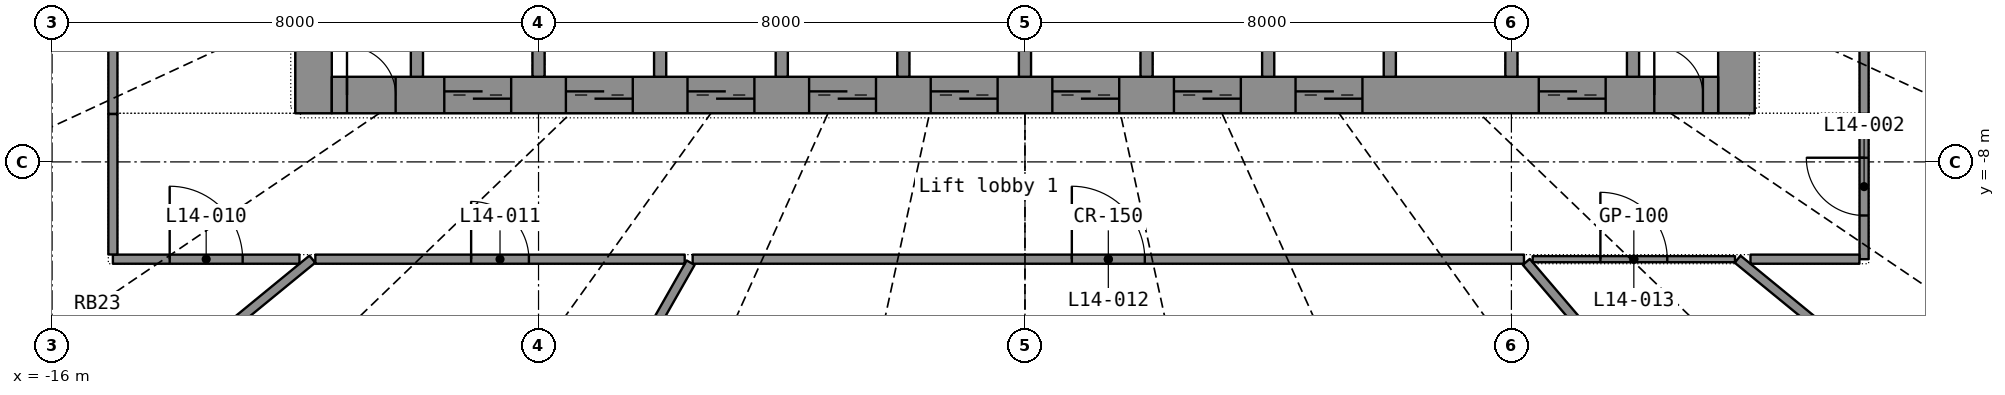
"""IFC4 building model, lengths in metres.
Left out: names, types, materials, properties, quantities, classifications, styles, units other than length and angle.
Written with IfcOpenShell. Run it as: python <this file> out.ifc"""

import sys

from ifc_helpers import new_model, si_unit, direction, frame, frame_2d, origin, place, context, subcontext, project, spatial, rectangle, extrude, element, fill, save


model = new_model("IFC4")
c1 = context("Model", 3, precision=1e-05, world=origin(), true_north=direction((0.0, 1.0)))
c2 = subcontext(c1, "Body", "Model", "MODEL_VIEW")
j1 = project(units=[si_unit("LENGTHUNIT", "METRE"), si_unit("PLANEANGLEUNIT", "RADIAN")], contexts=[c1])
p1 = place(None, origin())
s1 = spatial("IfcSite", under=j1, at=p1, CompositionType="ELEMENT")
p2 = place(p1, origin())
s2 = spatial("IfcBuilding", under=s1, at=p2, CompositionType="ELEMENT")
p3 = place(p2, frame((0.0, 0.0, 63.0)))
s3 = spatial("IfcBuildingStorey", under=s2, at=p3, CompositionType="ELEMENT", Elevation=63.0)
p4 = place(p3, frame((-11.7, -7.2, 0.0), z_axis=(0.0, 0.0, 1.0), x_axis=(0.0, 1.0, 0.0)))
e1 = element("IfcWall", 1, at=p4, inside=s3, PredefinedType="SHEAR", context=c2, shape_type="SweptSolid", body=[
    extrude(rectangle(XDim=14.4, YDim=0.6, at=frame_2d((7.2, 0.0))), origin(), (0.0, 0.0, 1.0), 3.3),
])
p5 = place(p4, frame((6.5, 0.0, 0.0)))
e2 = element("IfcOpeningElement", 2, at=p5, cuts=e1, PredefinedType="OPENING", context=c2, shape_type="SweptSolid", body=[
    extrude(rectangle(XDim=1.4, YDim=2.2, at=frame_2d((0.7, 1.1))), frame((0.0, 0.31, 0.0), z_axis=(0.0, -1.0, 0.0), x_axis=(1.0, 0.0, 0.0)), (0.0, 0.0, 1.0), 0.62),
])
p6 = place(p3, frame((11.7, -7.2, 0.0), z_axis=(0.0, 0.0, 1.0), x_axis=(0.0, 1.0, 0.0)))
e3 = element("IfcWall", 3, at=p6, inside=s3, PredefinedType="SHEAR", context=c2, shape_type="SweptSolid", body=[
    extrude(rectangle(XDim=14.4, YDim=0.6, at=frame_2d((7.2, 0.0))), origin(), (0.0, 0.0, 1.0), 3.3),
])
p7 = place(p6, frame((6.5, 0.0, 0.0)))
e4 = element("IfcOpeningElement", 4, at=p7, cuts=e3, PredefinedType="OPENING", context=c2, shape_type="SweptSolid", body=[
    extrude(rectangle(XDim=1.4, YDim=2.2, at=frame_2d((0.7, 1.1))), frame((0.0, 0.31, 0.0), z_axis=(0.0, -1.0, 0.0), x_axis=(1.0, 0.0, 0.0)), (0.0, 0.0, 1.0), 0.62),
])
p8 = place(p3, frame((-11.4, -6.9, 0.0), z_axis=(0.0, 0.0, 1.0), x_axis=(1.0, 0.0, 0.0)))
e5 = element("IfcWall", 5, at=p8, inside=s3, PredefinedType="SHEAR", context=c2, shape_type="SweptSolid", body=[
    extrude(rectangle(XDim=22.8, YDim=0.6, at=frame_2d((11.4, 0.0))), origin(), (0.0, 0.0, 1.0), 3.3),
])
p9 = place(p8, frame((1.85, 0.0, 0.0)))
e6 = element("IfcOpeningElement", 6, at=p9, cuts=e5, PredefinedType="OPENING", context=c2, shape_type="SweptSolid", body=[
    extrude(rectangle(XDim=1.1, YDim=2.2, at=frame_2d((0.55, 1.1))), frame((0.0, 0.31, 0.0), z_axis=(0.0, -1.0, 0.0), x_axis=(1.0, 0.0, 0.0)), (0.0, 0.0, 1.0), 0.62),
])
p10 = place(p8, frame((3.85, 0.0, 0.0)))
e7 = element("IfcOpeningElement", 7, at=p10, cuts=e5, PredefinedType="OPENING", context=c2, shape_type="SweptSolid", body=[
    extrude(rectangle(XDim=1.1, YDim=2.2, at=frame_2d((0.55, 1.1))), frame((0.0, 0.31, 0.0), z_axis=(0.0, -1.0, 0.0), x_axis=(1.0, 0.0, 0.0)), (0.0, 0.0, 1.0), 0.62),
])
p11 = place(p8, frame((5.85, 0.0, 0.0)))
e8 = element("IfcOpeningElement", 8, at=p11, cuts=e5, PredefinedType="OPENING", context=c2, shape_type="SweptSolid", body=[
    extrude(rectangle(XDim=1.1, YDim=2.2, at=frame_2d((0.55, 1.1))), frame((0.0, 0.31, 0.0), z_axis=(0.0, -1.0, 0.0), x_axis=(1.0, 0.0, 0.0)), (0.0, 0.0, 1.0), 0.62),
])
p12 = place(p8, frame((7.85, 0.0, 0.0)))
e9 = element("IfcOpeningElement", 9, at=p12, cuts=e5, PredefinedType="OPENING", context=c2, shape_type="SweptSolid", body=[
    extrude(rectangle(XDim=1.1, YDim=2.2, at=frame_2d((0.55, 1.1))), frame((0.0, 0.31, 0.0), z_axis=(0.0, -1.0, 0.0), x_axis=(1.0, 0.0, 0.0)), (0.0, 0.0, 1.0), 0.62),
])
p13 = place(p8, frame((9.85, 0.0, 0.0)))
e10 = element("IfcOpeningElement", 10, at=p13, cuts=e5, PredefinedType="OPENING", context=c2, shape_type="SweptSolid", body=[
    extrude(rectangle(XDim=1.1, YDim=2.2, at=frame_2d((0.55, 1.1))), frame((0.0, 0.31, 0.0), z_axis=(0.0, -1.0, 0.0), x_axis=(1.0, 0.0, 0.0)), (0.0, 0.0, 1.0), 0.62),
])
p14 = place(p8, frame((11.85, 0.0, 0.0)))
e11 = element("IfcOpeningElement", 11, at=p14, cuts=e5, PredefinedType="OPENING", context=c2, shape_type="SweptSolid", body=[
    extrude(rectangle(XDim=1.1, YDim=2.2, at=frame_2d((0.55, 1.1))), frame((0.0, 0.31, 0.0), z_axis=(0.0, -1.0, 0.0), x_axis=(1.0, 0.0, 0.0)), (0.0, 0.0, 1.0), 0.62),
])
p15 = place(p8, frame((13.85, 0.0, 0.0)))
e12 = element("IfcOpeningElement", 12, at=p15, cuts=e5, PredefinedType="OPENING", context=c2, shape_type="SweptSolid", body=[
    extrude(rectangle(XDim=1.1, YDim=2.2, at=frame_2d((0.55, 1.1))), frame((0.0, 0.31, 0.0), z_axis=(0.0, -1.0, 0.0), x_axis=(1.0, 0.0, 0.0)), (0.0, 0.0, 1.0), 0.62),
])
p16 = place(p8, frame((15.85, 0.0, 0.0)))
e13 = element("IfcOpeningElement", 13, at=p16, cuts=e5, PredefinedType="OPENING", context=c2, shape_type="SweptSolid", body=[
    extrude(rectangle(XDim=1.1, YDim=2.2, at=frame_2d((0.55, 1.1))), frame((0.0, 0.31, 0.0), z_axis=(0.0, -1.0, 0.0), x_axis=(1.0, 0.0, 0.0)), (0.0, 0.0, 1.0), 0.62),
])
p17 = place(p8, frame((19.85, 0.0, 0.0)))
e14 = element("IfcOpeningElement", 14, at=p17, cuts=e5, PredefinedType="OPENING", context=c2, shape_type="SweptSolid", body=[
    extrude(rectangle(XDim=1.1, YDim=2.2, at=frame_2d((0.55, 1.1))), frame((0.0, 0.31, 0.0), z_axis=(0.0, -1.0, 0.0), x_axis=(1.0, 0.0, 0.0)), (0.0, 0.0, 1.0), 0.62),
])
p18 = place(p8, frame((0.25, 0.0, 0.0)))
e15 = element("IfcOpeningElement", 15, at=p18, cuts=e5, PredefinedType="OPENING", context=c2, shape_type="SweptSolid", body=[
    extrude(rectangle(XDim=0.8, YDim=2.05, at=frame_2d((0.4, 1.025))), frame((0.0, 0.31, 0.0), z_axis=(0.0, -1.0, 0.0), x_axis=(1.0, 0.0, 0.0)), (0.0, 0.0, 1.0), 0.62),
])
p19 = place(p8, frame((21.75, 0.0, 0.0)))
e16 = element("IfcOpeningElement", 16, at=p19, cuts=e5, PredefinedType="OPENING", context=c2, shape_type="SweptSolid", body=[
    extrude(rectangle(XDim=0.8, YDim=2.05, at=frame_2d((0.4, 1.025))), frame((0.0, 0.31, 0.0), z_axis=(0.0, -1.0, 0.0), x_axis=(1.0, 0.0, 0.0)), (0.0, 0.0, 1.0), 0.62),
])
for number, where, z_axis, x_axis in (
    (17, (-10.0, -6.6, 0.0), (0.0, 0.0, 1.0), (0.0, 1.0, 0.0)),
    (18, (-8.0, -6.6, 0.0), (0.0, 0.0, 1.0), (0.0, 1.0, 0.0)),
    (19, (-6.0, -6.6, 0.0), (0.0, 0.0, 1.0), (0.0, 1.0, 0.0)),
    (20, (-4.0, -6.6, 0.0), (0.0, 0.0, 1.0), (0.0, 1.0, 0.0)),
    (21, (-2.0, -6.6, 0.0), (0.0, 0.0, 1.0), (0.0, 1.0, 0.0)),
    (22, (0.0, -6.6, 0.0), (0.0, 0.0, 1.0), (0.0, 1.0, 0.0)),
    (23, (2.0, -6.6, 0.0), (0.0, 0.0, 1.0), (0.0, 1.0, 0.0)),
    (24, (4.0, -6.6, 0.0), (0.0, 0.0, 1.0), (0.0, 1.0, 0.0)),
    (25, (6.0, -6.6, 0.0), (0.0, 0.0, 1.0), (0.0, 1.0, 0.0)),
    (26, (8.0, -6.6, 0.0), (0.0, 0.0, 1.0), (0.0, 1.0, 0.0)),
    (27, (10.0, -6.6, 0.0), (0.0, 0.0, 1.0), (0.0, 1.0, 0.0)),
):
    element("IfcWall", number, at=place(p3, frame(where, z_axis=z_axis, x_axis=x_axis)), inside=s3, PredefinedType="SHEAR", context=c2, shape_type="SweptSolid", body=[
        extrude(rectangle(XDim=2.7, YDim=0.2, at=frame_2d((1.35, 0.0))), origin(), (0.0, 0.0, 1.0), 3.3),
    ])
p20 = place(p3, frame((-5.465, -9.6, 0.0), z_axis=(0.0, 0.0, 1.0), x_axis=(1.0, 0.0, 0.0)))
e28 = element("IfcWall", 28, at=p20, inside=s3, PredefinedType="PARTITIONING", context=c2, shape_type="SweptSolid", body=[
    extrude(rectangle(XDim=13.672, YDim=0.15, at=frame_2d((6.836, 0.0))), origin(), (0.0, 0.0, 1.0), 2.4),
])
p21 = place(p20, frame((6.236, 0.0, 0.0)))
e29 = element("IfcOpeningElement", 29, at=p21, cuts=e28, PredefinedType="OPENING", context=c2, shape_type="SweptSolid", body=[
    extrude(rectangle(XDim=1.2, YDim=2.2, at=frame_2d((0.6, 1.1))), frame((0.0, 0.085, 0.0), z_axis=(0.0, -1.0, 0.0), x_axis=(1.0, 0.0, 0.0)), (0.0, 0.0, 1.0), 0.17),
])
p22 = place(p3, frame((-11.476, -20.159, 0.0), z_axis=(0.0, 0.0, 1.0), x_axis=(0.494734776, 0.869044016, 0.0)))
e30 = element("IfcWall", 30, at=p22, inside=s3, PredefinedType="PARTITIONING", context=c2, shape_type="SweptSolid", body=[
    extrude(rectangle(XDim=12.083, YDim=0.15, at=frame_2d((6.042, 0.0))), origin(), (0.0, 0.0, 1.0), 2.4),
])
p23 = place(p3, frame((15.577, -18.223, 0.0), z_axis=(0.0, 0.0, 1.0), x_axis=(-0.649782359, 0.76012031, 0.0)))
e31 = element("IfcWall", 31, at=p23, inside=s3, PredefinedType="PARTITIONING", context=c2, shape_type="SweptSolid", body=[
    extrude(rectangle(XDim=11.285, YDim=0.15, at=frame_2d((5.642, 0.0))), origin(), (0.0, 0.0, 1.0), 2.4),
])
p24 = place(p3, frame((-15.0, 3.217, 0.0), z_axis=(0.0, 0.0, 1.0), x_axis=(0.0, -1.0, 0.0)))
e32 = element("IfcWall", 32, at=p24, inside=s3, PredefinedType="PARTITIONING", context=c2, shape_type="SweptSolid", body=[
    extrude(rectangle(XDim=10.429, YDim=0.15, at=frame_2d((5.214, 0.0))), origin(), (0.0, 0.0, 1.0), 2.4),
])
p25 = place(p24, frame((4.615, 0.0, 0.0)))
e33 = element("IfcOpeningElement", 33, at=p25, cuts=e32, PredefinedType="OPENING", context=c2, shape_type="SweptSolid", body=[
    extrude(rectangle(XDim=1.2, YDim=2.2, at=frame_2d((0.6, 1.1))), frame((0.0, 0.085, 0.0), z_axis=(0.0, -1.0, 0.0), x_axis=(1.0, 0.0, 0.0)), (0.0, 0.0, 1.0), 0.17),
])
for number, where, z_axis, x_axis in (
    (34, (-19.207, -15.733, 0.0), (0.0, 0.0, 1.0), (0.774, 0.634, 0.0)),
    (35, (11.72, -9.6, 0.0), (0.0, 0.0, 1.0), (0.774, -0.634, 0.0)),
):
    element("IfcWall", number, at=place(p3, frame(where, z_axis=z_axis, x_axis=x_axis)), inside=s3, PredefinedType="PARTITIONING", context=c2, shape_type="SweptSolid", body=[
        extrude(rectangle(XDim=9.678, YDim=0.15, at=frame_2d((4.839, 0.0))), origin(), (0.0, 0.0, 1.0), 2.4),
    ])
p26 = place(p3, frame((-11.671, -9.6, 0.0), z_axis=(0.0, 0.0, 1.0), x_axis=(1.0, 0.0, 0.0)))
e36 = element("IfcWall", 36, at=p26, inside=s3, PredefinedType="PARTITIONING", context=c2, shape_type="SweptSolid", body=[
    extrude(rectangle(XDim=6.074, YDim=0.15, at=frame_2d((3.037, 0.0))), origin(), (0.0, 0.0, 1.0), 2.4),
])
p27 = place(p26, frame((2.562, 0.0, 0.0)))
e37 = element("IfcOpeningElement", 37, at=p27, cuts=e36, PredefinedType="OPENING", context=c2, shape_type="SweptSolid", body=[
    extrude(rectangle(XDim=0.95, YDim=2.15, at=frame_2d((0.475, 1.075))), frame((0.0, 0.085, 0.0), z_axis=(0.0, -1.0, 0.0), x_axis=(1.0, 0.0, 0.0)), (0.0, 0.0, 1.0), 0.17),
])
p28 = place(p3, frame((13.8, -7.212, 0.0), z_axis=(0.0, 0.0, 1.0), x_axis=(0.0, 1.0, 0.0)))
e38 = element("IfcWall", 38, at=p28, inside=s3, PredefinedType="PARTITIONING", context=c2, shape_type="SweptSolid", body=[
    extrude(rectangle(XDim=4.088, YDim=0.15, at=frame_2d((2.044, 0.0))), origin(), (0.0, 0.0, 1.0), 2.4),
])
p29 = place(p28, frame((1.569, 0.0, 0.0)))
e39 = element("IfcOpeningElement", 39, at=p29, cuts=e38, PredefinedType="OPENING", context=c2, shape_type="SweptSolid", body=[
    extrude(rectangle(XDim=0.95, YDim=2.15, at=frame_2d((0.475, 1.075))), frame((0.0, 0.085, 0.0), z_axis=(0.0, -1.0, 0.0), x_axis=(1.0, 0.0, 0.0)), (0.0, 0.0, 1.0), 0.17),
])
p30 = place(p3, frame((8.35, -9.6, 0.0), z_axis=(0.0, 0.0, 1.0), x_axis=(1.0, 0.0, 0.0)))
e40 = element("IfcWall", 40, at=p30, inside=s3, PredefinedType="PARTITIONING", context=c2, shape_type="SweptSolid", body=[
    extrude(rectangle(XDim=3.327, YDim=0.1, at=frame_2d((1.664, 0.0))), origin(), (0.0, 0.0, 1.0), 2.4),
])
p31 = place(p30, frame((1.114, 0.0, 0.0)))
e41 = element("IfcOpeningElement", 41, at=p31, cuts=e40, PredefinedType="OPENING", context=c2, shape_type="SweptSolid", body=[
    extrude(rectangle(XDim=1.1, YDim=2.2, at=frame_2d((0.55, 1.1))), frame((0.0, 0.06, 0.0), z_axis=(0.0, -1.0, 0.0), x_axis=(1.0, 0.0, 0.0)), (0.0, 0.0, 1.0), 0.12),
])
p32 = place(p3, frame((-15.0, -9.6, 0.0), z_axis=(0.0, 0.0, 1.0), x_axis=(1.0, 0.0, 0.0)))
e42 = element("IfcWall", 42, at=p32, inside=s3, PredefinedType="PARTITIONING", context=c2, shape_type="SweptSolid", body=[
    extrude(rectangle(XDim=3.068, YDim=0.15, at=frame_2d((1.534, 0.0))), origin(), (0.0, 0.0, 1.0), 2.4),
])
p33 = place(p32, frame((0.934, 0.0, 0.0)))
e43 = element("IfcOpeningElement", 43, at=p33, cuts=e42, PredefinedType="OPENING", context=c2, shape_type="SweptSolid", body=[
    extrude(rectangle(XDim=1.2, YDim=2.2, at=frame_2d((0.6, 1.1))), frame((0.0, 0.085, 0.0), z_axis=(0.0, -1.0, 0.0), x_axis=(1.0, 0.0, 0.0)), (0.0, 0.0, 1.0), 0.17),
])
p34 = place(p3, frame((-15.0, -7.213, 0.0), z_axis=(0.0, 0.0, 1.0), x_axis=(0.0, -1.0, 0.0)))
e44 = element("IfcWall", 44, at=p34, inside=s3, PredefinedType="PARTITIONING", context=c2, shape_type="SweptSolid", body=[
    extrude(rectangle(XDim=2.31, YDim=0.15, at=frame_2d((1.155, 0.0))), origin(), (0.0, 0.0, 1.0), 2.4),
])
p35 = place(p3, frame((13.8, -9.6, 0.0), z_axis=(0.0, 0.0, 1.0), x_axis=(0.0, 1.0, 0.0)))
e45 = element("IfcWall", 45, at=p35, inside=s3, PredefinedType="PARTITIONING", context=c2, shape_type="SweptSolid", body=[
    extrude(rectangle(XDim=2.387, YDim=0.15, at=frame_2d((1.194, 0.0))), origin(), (0.0, 0.0, 1.0), 2.4),
])
p36 = place(p35, frame((0.719, 0.0, 0.0)))
e46 = element("IfcOpeningElement", 46, at=p36, cuts=e45, PredefinedType="OPENING", context=c2, shape_type="SweptSolid", body=[
    extrude(rectangle(XDim=0.95, YDim=2.15, at=frame_2d((0.475, 1.075))), frame((0.0, 0.085, 0.0), z_axis=(0.0, -1.0, 0.0), x_axis=(1.0, 0.0, 0.0)), (0.0, 0.0, 1.0), 0.17),
])
p37 = place(p3, frame((11.932, -9.6, 0.0), z_axis=(0.0, 0.0, 1.0), x_axis=(1.0, 0.0, 0.0)))
e47 = element("IfcWall", 47, at=p37, inside=s3, PredefinedType="PARTITIONING", context=c2, shape_type="SweptSolid", body=[
    extrude(rectangle(XDim=1.791, YDim=0.15, at=frame_2d((0.896, 0.0))), origin(), (0.0, 0.0, 1.0), 2.4),
])
p38 = place(p9, origin())
e48 = element("IfcDoor", 48, at=p38, inside=s3, OperationType="DOUBLE_DOOR_SLIDING", PredefinedType="DOOR", context=c2, shape_type="SweptSolid", body=[
    extrude(rectangle(XDim=1.1, YDim=2.2, at=frame_2d((0.55, 1.1))), frame((0.0, 0.025, 0.0), z_axis=(0.0, -1.0, 0.0), x_axis=(1.0, 0.0, 0.0)), (0.0, 0.0, 1.0), 0.05),
])
fill(e6, e48)
p39 = place(p10, origin())
e49 = element("IfcDoor", 49, at=p39, inside=s3, OperationType="DOUBLE_DOOR_SLIDING", PredefinedType="DOOR", context=c2, shape_type="SweptSolid", body=[
    extrude(rectangle(XDim=1.1, YDim=2.2, at=frame_2d((0.55, 1.1))), frame((0.0, 0.025, 0.0), z_axis=(0.0, -1.0, 0.0), x_axis=(1.0, 0.0, 0.0)), (0.0, 0.0, 1.0), 0.05),
])
fill(e7, e49)
p40 = place(p11, origin())
e50 = element("IfcDoor", 50, at=p40, inside=s3, OperationType="DOUBLE_DOOR_SLIDING", PredefinedType="DOOR", context=c2, shape_type="SweptSolid", body=[
    extrude(rectangle(XDim=1.1, YDim=2.2, at=frame_2d((0.55, 1.1))), frame((0.0, 0.025, 0.0), z_axis=(0.0, -1.0, 0.0), x_axis=(1.0, 0.0, 0.0)), (0.0, 0.0, 1.0), 0.05),
])
fill(e8, e50)
p41 = place(p12, origin())
e51 = element("IfcDoor", 51, at=p41, inside=s3, OperationType="DOUBLE_DOOR_SLIDING", PredefinedType="DOOR", context=c2, shape_type="SweptSolid", body=[
    extrude(rectangle(XDim=1.1, YDim=2.2, at=frame_2d((0.55, 1.1))), frame((0.0, 0.025, 0.0), z_axis=(0.0, -1.0, 0.0), x_axis=(1.0, 0.0, 0.0)), (0.0, 0.0, 1.0), 0.05),
])
fill(e9, e51)
p42 = place(p13, origin())
e52 = element("IfcDoor", 52, at=p42, inside=s3, OperationType="DOUBLE_DOOR_SLIDING", PredefinedType="DOOR", context=c2, shape_type="SweptSolid", body=[
    extrude(rectangle(XDim=1.1, YDim=2.2, at=frame_2d((0.55, 1.1))), frame((0.0, 0.025, 0.0), z_axis=(0.0, -1.0, 0.0), x_axis=(1.0, 0.0, 0.0)), (0.0, 0.0, 1.0), 0.05),
])
fill(e10, e52)
p43 = place(p14, origin())
e53 = element("IfcDoor", 53, at=p43, inside=s3, OperationType="DOUBLE_DOOR_SLIDING", PredefinedType="DOOR", context=c2, shape_type="SweptSolid", body=[
    extrude(rectangle(XDim=1.1, YDim=2.2, at=frame_2d((0.55, 1.1))), frame((0.0, 0.025, 0.0), z_axis=(0.0, -1.0, 0.0), x_axis=(1.0, 0.0, 0.0)), (0.0, 0.0, 1.0), 0.05),
])
fill(e11, e53)
p44 = place(p15, origin())
e54 = element("IfcDoor", 54, at=p44, inside=s3, OperationType="DOUBLE_DOOR_SLIDING", PredefinedType="DOOR", context=c2, shape_type="SweptSolid", body=[
    extrude(rectangle(XDim=1.1, YDim=2.2, at=frame_2d((0.55, 1.1))), frame((0.0, 0.025, 0.0), z_axis=(0.0, -1.0, 0.0), x_axis=(1.0, 0.0, 0.0)), (0.0, 0.0, 1.0), 0.05),
])
fill(e12, e54)
p45 = place(p16, origin())
e55 = element("IfcDoor", 55, at=p45, inside=s3, OperationType="DOUBLE_DOOR_SLIDING", PredefinedType="DOOR", context=c2, shape_type="SweptSolid", body=[
    extrude(rectangle(XDim=1.1, YDim=2.2, at=frame_2d((0.55, 1.1))), frame((0.0, 0.025, 0.0), z_axis=(0.0, -1.0, 0.0), x_axis=(1.0, 0.0, 0.0)), (0.0, 0.0, 1.0), 0.05),
])
fill(e13, e55)
p46 = place(p17, origin())
e56 = element("IfcDoor", 56, at=p46, inside=s3, OperationType="DOUBLE_DOOR_SLIDING", PredefinedType="DOOR", context=c2, shape_type="SweptSolid", body=[
    extrude(rectangle(XDim=1.1, YDim=2.2, at=frame_2d((0.55, 1.1))), frame((0.0, 0.025, 0.0), z_axis=(0.0, -1.0, 0.0), x_axis=(1.0, 0.0, 0.0)), (0.0, 0.0, 1.0), 0.05),
])
fill(e14, e56)
p47 = place(p18, origin())
e57 = element("IfcDoor", 57, at=p47, inside=s3, OperationType="SINGLE_SWING_LEFT", PredefinedType="DOOR", context=c2, shape_type="SweptSolid", body=[
    extrude(rectangle(XDim=0.8, YDim=2.05, at=frame_2d((0.4, 1.025))), frame((0.0, 0.025, 0.0), z_axis=(0.0, -1.0, 0.0), x_axis=(1.0, 0.0, 0.0)), (0.0, 0.0, 1.0), 0.05),
])
fill(e15, e57)
p48 = place(p19, origin())
e58 = element("IfcDoor", 58, at=p48, inside=s3, OperationType="SINGLE_SWING_LEFT", PredefinedType="DOOR", context=c2, shape_type="SweptSolid", body=[
    extrude(rectangle(XDim=0.8, YDim=2.05, at=frame_2d((0.4, 1.025))), frame((0.0, 0.025, 0.0), z_axis=(0.0, -1.0, 0.0), x_axis=(1.0, 0.0, 0.0)), (0.0, 0.0, 1.0), 0.05),
])
fill(e16, e58)
p49 = place(p36, origin())
e59 = element("IfcDoor", 59, at=p49, inside=s3, OperationType="SINGLE_SWING_RIGHT", PredefinedType="DOOR", context=c2, shape_type="SweptSolid", body=[
    extrude(rectangle(XDim=0.95, YDim=2.15, at=frame_2d((0.475, 1.075))), frame((0.0, 0.025, 0.0), z_axis=(0.0, -1.0, 0.0), x_axis=(1.0, 0.0, 0.0)), (0.0, 0.0, 1.0), 0.05),
])
fill(e46, e59)
p50 = place(p33, origin())
e60 = element("IfcDoor", 60, at=p50, inside=s3, OperationType="DOUBLE_DOOR_SINGLE_SWING", PredefinedType="DOOR", context=c2, shape_type="SweptSolid", body=[
    extrude(rectangle(XDim=1.2, YDim=2.2, at=frame_2d((0.6, 1.1))), frame((0.0, 0.025, 0.0), z_axis=(0.0, -1.0, 0.0), x_axis=(1.0, 0.0, 0.0)), (0.0, 0.0, 1.0), 0.05),
])
fill(e43, e60)
p51 = place(p27, origin())
e61 = element("IfcDoor", 61, at=p51, inside=s3, OperationType="SINGLE_SWING_LEFT", PredefinedType="DOOR", context=c2, shape_type="SweptSolid", body=[
    extrude(rectangle(XDim=0.95, YDim=2.15, at=frame_2d((0.475, 1.075))), frame((0.0, 0.025, 0.0), z_axis=(0.0, -1.0, 0.0), x_axis=(1.0, 0.0, 0.0)), (0.0, 0.0, 1.0), 0.05),
])
fill(e37, e61)
p52 = place(p21, origin())
e62 = element("IfcDoor", 62, at=p52, inside=s3, OperationType="DOUBLE_DOOR_SINGLE_SWING", PredefinedType="DOOR", context=c2, shape_type="SweptSolid", body=[
    extrude(rectangle(XDim=1.2, YDim=2.2, at=frame_2d((0.6, 1.1))), frame((0.0, 0.025, 0.0), z_axis=(0.0, -1.0, 0.0), x_axis=(1.0, 0.0, 0.0)), (0.0, 0.0, 1.0), 0.05),
])
fill(e29, e62)
p53 = place(p31, origin())
e63 = element("IfcDoor", 63, at=p53, inside=s3, OperationType="SINGLE_SWING_LEFT", PredefinedType="DOOR", context=c2, shape_type="SweptSolid", body=[
    extrude(rectangle(XDim=1.1, YDim=2.2, at=frame_2d((0.55, 1.1))), frame((0.0, 0.025, 0.0), z_axis=(0.0, -1.0, 0.0), x_axis=(1.0, 0.0, 0.0)), (0.0, 0.0, 1.0), 0.05),
])
fill(e41, e63)
save(model, sys.argv[1])
